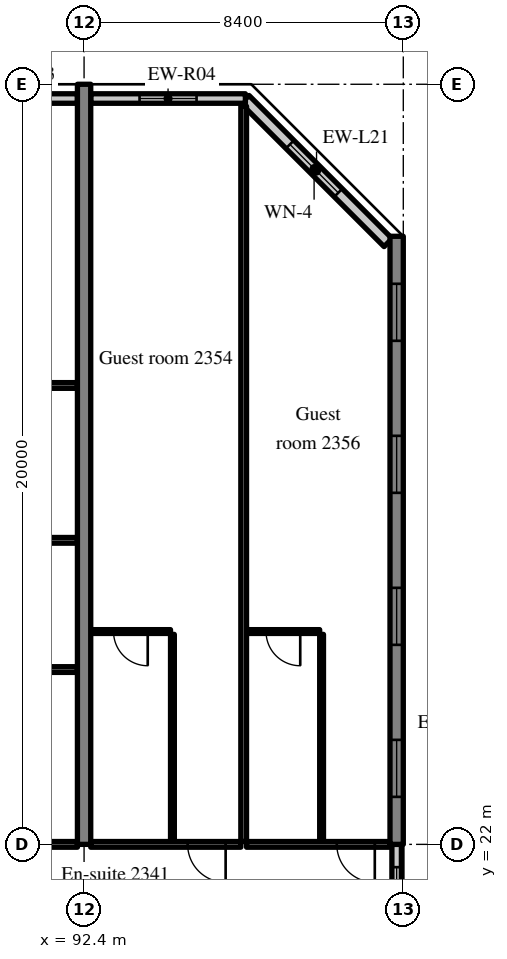
"""IFC4 building model, lengths in metres.
Left out: names, types, materials, properties, quantities, classifications, styles, units other than length and angle.
Written with IfcOpenShell. Run it as: python <this file> out.ifc"""

import sys

from ifc_helpers import new_model, si_unit, direction, frame, frame_2d, origin, place, context, subcontext, project, spatial, rectangle, extrude, source, transform, mapped, element, fill, save


model = new_model("IFC4")
c1 = context("Model", 3, precision=1e-05, world=origin(), true_north=direction((0.0, 1.0)))
c2 = subcontext(c1, "Body", "Model", "MODEL_VIEW")
j1 = project(units=[si_unit("LENGTHUNIT", "METRE"), si_unit("PLANEANGLEUNIT", "RADIAN")], contexts=[c1])
p1 = place(None, origin())
s1 = spatial("IfcSite", under=j1, at=p1, CompositionType="ELEMENT")
p2 = place(p1, origin())
s2 = spatial("IfcBuilding", under=s1, at=p2, CompositionType="ELEMENT")
p3 = place(p2, frame((0.0, 0.0, 99.0)))
s3 = spatial("IfcBuildingStorey", under=s2, at=p3, CompositionType="ELEMENT", Elevation=99.0)
m1 = source(origin(), c2, "Body", "SweptSolid", [
    extrude(rectangle(XDim=20.0, YDim=0.35, at=frame_2d((10.0, 0.0))), origin(), (0.0, 0.0, 1.0), 3.52),
])
p4 = place(p3, frame((92.4, 22.0, 0.0), z_axis=(0.0, 0.0, 1.0), x_axis=(0.0, 1.0, 0.0)))
e1 = element("IfcWall", 1, at=p4, inside=s3, PredefinedType="SHEAR", context=c2, shape_type="MappedRepresentation", body=[
    mapped(m1, transform((0.0, 0.0, 0.0), scale=1.0)),
])
m2 = source(origin(), c2, "Body", "SweptSolid", [
    extrude(rectangle(XDim=16.0, YDim=0.35, at=frame_2d((8.0, 0.0))), origin(), (0.0, 0.0, 1.0), 3.52),
])
p5 = place(p3, frame((100.625, 22.0, 0.0), z_axis=(0.0, 0.0, 1.0), x_axis=(0.0, 1.0, 0.0)))
e2 = element("IfcWall", 2, at=p5, inside=s3, PredefinedType="SHEAR", context=c2, shape_type="MappedRepresentation", body=[
    mapped(m2, transform((0.0, 0.0, 0.0), scale=1.0)),
])
m3 = source(origin(), c2, "Body", "SweptSolid", [
    extrude(rectangle(XDim=1.5, YDim=1.5, at=frame_2d((0.75, 0.75))), frame((0.0, 0.185, 0.0), z_axis=(0.0, -1.0, 0.0), x_axis=(1.0, 0.0, 0.0)), (0.0, 0.0, 1.0), 0.37),
])
p6 = place(p5, frame((1.25, 0.0, 0.9)))
e3 = element("IfcOpeningElement", 3, at=p6, cuts=e2, PredefinedType="OPENING", context=c2, shape_type="MappedRepresentation", body=[
    mapped(m3, transform((0.0, 0.0, 0.0), scale=1.0)),
])
p7 = place(p5, frame((5.25, 0.0, 0.9)))
e4 = element("IfcOpeningElement", 4, at=p7, cuts=e2, PredefinedType="OPENING", context=c2, shape_type="MappedRepresentation", body=[
    mapped(m3, transform((0.0, 0.0, 0.0), scale=1.0)),
])
p8 = place(p5, frame((9.25, 0.0, 0.9)))
e5 = element("IfcOpeningElement", 5, at=p8, cuts=e2, PredefinedType="OPENING", context=c2, shape_type="MappedRepresentation", body=[
    mapped(m3, transform((0.0, 0.0, 0.0), scale=1.0)),
])
p9 = place(p5, frame((13.25, 0.0, 0.9)))
e6 = element("IfcOpeningElement", 6, at=p9, cuts=e2, PredefinedType="OPENING", context=c2, shape_type="MappedRepresentation", body=[
    mapped(m3, transform((0.0, 0.0, 0.0), scale=1.0)),
])
m4 = source(origin(), c2, "Body", "SweptSolid", [
    extrude(rectangle(XDim=5.326, YDim=0.3, at=frame_2d((2.663, 0.0))), origin(), (0.0, 0.0, 1.0), 3.52),
])
p10 = place(p3, frame((100.4, 37.834, 0.0), z_axis=(0.0, 0.0, 1.0), x_axis=(-0.707083859269, 0.707129702361, 0.0)))
e7 = element("IfcWall", 7, at=p10, inside=s3, PredefinedType="SOLIDWALL", context=c2, shape_type="MappedRepresentation", body=[
    mapped(m4, transform((0.0, 0.0, 0.0), scale=1.0)),
])
m5 = source(origin(), c2, "Body", "SweptSolid", [
    extrude(rectangle(XDim=1.8, YDim=1.5, at=frame_2d((0.9, 0.75))), frame((0.0, 0.16, 0.0), z_axis=(0.0, -1.0, 0.0), x_axis=(1.0, 0.0, 0.0)), (0.0, 0.0, 1.0), 0.32),
])
p11 = place(p10, frame((1.854, 0.0, 0.9)))
e8 = element("IfcOpeningElement", 8, at=p11, cuts=e7, PredefinedType="OPENING", context=c2, shape_type="MappedRepresentation", body=[
    mapped(m5, transform((0.0, 0.0, 0.0), scale=1.0)),
])
m6 = source(origin(), c2, "Body", "SweptSolid", [
    extrude(rectangle(XDim=3.675, YDim=0.25, at=frame_2d((1.837, 0.0))), origin(), (0.0, 0.0, 1.0), 2.82),
])
p12 = place(p3, frame((92.225, 41.625, 0.0), z_axis=(0.0, 0.0, 1.0), x_axis=(-1.0, 0.0, 0.0)))
e9 = element("IfcWall", 9, at=p12, inside=s3, PredefinedType="SOLIDWALL", context=c2, shape_type="MappedRepresentation", body=[
    mapped(m6, transform((0.0, 0.0, 0.0), scale=1.0)),
])
m7 = source(origin(), c2, "Body", "SweptSolid", [
    extrude(rectangle(XDim=1.5, YDim=1.5, at=frame_2d((0.75, 0.75))), frame((0.0, 0.135, 0.0), z_axis=(0.0, -1.0, 0.0), x_axis=(1.0, 0.0, 0.0)), (0.0, 0.0, 1.0), 0.27),
])
p13 = place(p12, frame((1.087, 0.0, 0.9)))
e10 = element("IfcOpeningElement", 10, at=p13, cuts=e9, PredefinedType="OPENING", context=c2, shape_type="MappedRepresentation", body=[
    mapped(m7, transform((0.0, 0.0, 0.0), scale=1.0)),
])
m8 = source(origin(), c2, "Body", "SweptSolid", [
    extrude(rectangle(XDim=4.07, YDim=0.25, at=frame_2d((2.035, 0.0))), origin(), (0.0, 0.0, 1.0), 2.82),
])
p14 = place(p3, frame((96.645, 41.625, 0.0), z_axis=(0.0, 0.0, 1.0), x_axis=(-1.0, 0.0, 0.0)))
e11 = element("IfcWall", 11, at=p14, inside=s3, PredefinedType="SOLIDWALL", context=c2, shape_type="MappedRepresentation", body=[
    mapped(m8, transform((0.0, 0.0, 0.0), scale=1.0)),
])
p15 = place(p14, frame((1.285, 0.0, 0.9)))
e12 = element("IfcOpeningElement", 12, at=p15, cuts=e11, PredefinedType="OPENING", context=c2, shape_type="MappedRepresentation", body=[
    mapped(m7, transform((0.0, 0.0, 0.0), scale=1.0)),
])
m9 = source(origin(), c2, "Body", "SweptSolid", [
    extrude(rectangle(XDim=2.4, YDim=0.25, at=frame_2d((1.2, 0.0))), origin(), (0.0, 0.0, 1.0), 2.62),
])
p16 = place(p3, frame((100.625, 19.6, 0.0), z_axis=(0.0, 0.0, 1.0), x_axis=(0.0, 1.0, 0.0)))
e13 = element("IfcWall", 13, at=p16, inside=s3, PredefinedType="SOLIDWALL", context=c2, shape_type="MappedRepresentation", body=[
    mapped(m9, transform((0.0, 0.0, 0.0), scale=1.0)),
])
m10 = source(origin(), c2, "Body", "SweptSolid", [
    extrude(rectangle(XDim=1.2, YDim=1.5, at=frame_2d((0.6, 0.75))), frame((0.0, 0.135, 0.0), z_axis=(0.0, -1.0, 0.0), x_axis=(1.0, 0.0, 0.0)), (0.0, 0.0, 1.0), 0.27),
])
p17 = place(p16, frame((0.6, 0.0, 0.9)))
e14 = element("IfcOpeningElement", 14, at=p17, cuts=e13, PredefinedType="OPENING", context=c2, shape_type="MappedRepresentation", body=[
    mapped(m10, transform((0.0, 0.0, 0.0), scale=1.0)),
])
m11 = source(origin(), c2, "Body", "SweptSolid", [
    extrude(rectangle(XDim=5.5, YDim=0.15, at=frame_2d((2.75, 0.0))), origin(), (0.0, 0.0, 1.0), 2.82),
])
p18 = place(p3, frame((86.725, 22.0, 0.0), z_axis=(0.0, 0.0, 1.0), x_axis=(1.0, 0.0, 0.0)))
e15 = element("IfcWall", 15, at=p18, inside=s3, PredefinedType="PARTITIONING", context=c2, shape_type="MappedRepresentation", body=[
    mapped(m11, transform((0.0, 0.0, 0.0), scale=1.0)),
])
m12 = source(origin(), c2, "Body", "SweptSolid", [
    extrude(rectangle(XDim=5.5, YDim=0.15, at=frame_2d((2.75, 0.0))), origin(), (0.0, 0.0, 1.0), 3.52),
])
for number, where, z_axis, x_axis in (
    (16, (86.725, 26.6, 0.0), (0.0, 0.0, 1.0), (1.0, 0.0, 0.0)),
    (17, (86.725, 30.0, 0.0), (0.0, 0.0, 1.0), (1.0, 0.0, 0.0)),
):
    element("IfcWall", number, at=place(p3, frame(where, z_axis=z_axis, x_axis=x_axis)), inside=s3, PredefinedType="PARTITIONING", context=c2, shape_type="MappedRepresentation", body=[
        mapped(m12, transform((0.0, 0.0, 0.0), scale=1.0)),
    ])
m13 = source(origin(), c2, "Body", "SweptSolid", [
    extrude(rectangle(XDim=8.05, YDim=0.15, at=frame_2d((4.025, 0.0))), origin(), (0.0, 0.0, 1.0), 3.52),
])
p19 = place(p3, frame((84.175, 34.075, 0.0), z_axis=(0.0, 0.0, 1.0), x_axis=(1.0, 0.0, 0.0)))
e18 = element("IfcWall", 18, at=p19, inside=s3, PredefinedType="PARTITIONING", context=c2, shape_type="MappedRepresentation", body=[
    mapped(m13, transform((0.0, 0.0, 0.0), scale=1.0)),
])
m14 = source(origin(), c2, "Body", "SweptSolid", [
    extrude(rectangle(XDim=1.0, YDim=2.1, at=frame_2d((0.5, 1.05))), frame((0.0, 0.085, 0.0), z_axis=(0.0, -1.0, 0.0), x_axis=(1.0, 0.0, 0.0)), (0.0, 0.0, 1.0), 0.17),
])
p20 = place(p19, frame((0.7, 0.0, 0.0)))
e19 = element("IfcOpeningElement", 19, at=p20, cuts=e18, PredefinedType="OPENING", context=c2, shape_type="MappedRepresentation", body=[
    mapped(m14, transform((0.0, 0.0, 0.0), scale=1.0)),
])
m15 = source(origin(), c2, "Body", "SweptSolid", [
    extrude(rectangle(XDim=5.45, YDim=0.1, at=frame_2d((2.725, 0.0))), origin(), (0.0, 0.0, 1.0), 3.52),
])
p21 = place(p3, frame((94.725, 22.075, 0.0), z_axis=(0.0, 0.0, 1.0), x_axis=(0.0, 1.0, 0.0)))
e20 = element("IfcWall", 20, at=p21, inside=s3, PredefinedType="PARTITIONING", context=c2, shape_type="MappedRepresentation", body=[
    mapped(m15, transform((0.0, 0.0, 0.0), scale=1.0)),
])
m16 = source(origin(), c2, "Body", "SweptSolid", [
    extrude(rectangle(XDim=2.1, YDim=0.1, at=frame_2d((1.05, 0.0))), origin(), (0.0, 0.0, 1.0), 3.52),
])
p22 = place(p3, frame((92.575, 27.6, 0.0), z_axis=(0.0, 0.0, 1.0), x_axis=(1.0, 0.0, 0.0)))
e21 = element("IfcWall", 21, at=p22, inside=s3, PredefinedType="PARTITIONING", context=c2, shape_type="MappedRepresentation", body=[
    mapped(m16, transform((0.0, 0.0, 0.0), scale=1.0)),
])
m17 = source(origin(), c2, "Body", "SweptSolid", [
    extrude(rectangle(XDim=0.9, YDim=2.1, at=frame_2d((0.45, 1.05))), frame((0.0, 0.06, 0.0), z_axis=(0.0, -1.0, 0.0), x_axis=(1.0, 0.0, 0.0)), (0.0, 0.0, 1.0), 0.12),
])
p23 = place(p22, frame((0.6, 0.0, 0.0)))
e22 = element("IfcOpeningElement", 22, at=p23, cuts=e21, PredefinedType="OPENING", context=c2, shape_type="MappedRepresentation", body=[
    mapped(m17, transform((0.0, 0.0, 0.0), scale=1.0)),
])
m18 = source(origin(), c2, "Body", "SweptSolid", [
    extrude(rectangle(XDim=3.95, YDim=0.15, at=frame_2d((1.975, 0.0))), origin(), (0.0, 0.0, 1.0), 2.82),
])
p24 = place(p3, frame((92.575, 22.0, 0.0), z_axis=(0.0, 0.0, 1.0), x_axis=(1.0, 0.0, 0.0)))
e23 = element("IfcWall", 23, at=p24, inside=s3, PredefinedType="PARTITIONING", context=c2, shape_type="MappedRepresentation", body=[
    mapped(m18, transform((0.0, 0.0, 0.0), scale=1.0)),
])
p25 = place(p24, frame((2.55, 0.0, 0.0)))
e24 = element("IfcOpeningElement", 24, at=p25, cuts=e23, PredefinedType="OPENING", context=c2, shape_type="MappedRepresentation", body=[
    mapped(m14, transform((0.0, 0.0, 0.0), scale=1.0)),
])
p26 = place(p3, frame((98.65, 22.075, 0.0), z_axis=(0.0, 0.0, 1.0), x_axis=(0.0, 1.0, 0.0)))
e25 = element("IfcWall", 25, at=p26, inside=s3, PredefinedType="PARTITIONING", context=c2, shape_type="MappedRepresentation", body=[
    mapped(m15, transform((0.0, 0.0, 0.0), scale=1.0)),
])
m19 = source(origin(), c2, "Body", "SweptSolid", [
    extrude(rectangle(XDim=1.925, YDim=0.1, at=frame_2d((0.962, 0.0))), origin(), (0.0, 0.0, 1.0), 3.52),
])
p27 = place(p3, frame((96.675, 27.6, 0.0), z_axis=(0.0, 0.0, 1.0), x_axis=(1.0, 0.0, 0.0)))
e26 = element("IfcWall", 26, at=p27, inside=s3, PredefinedType="PARTITIONING", context=c2, shape_type="MappedRepresentation", body=[
    mapped(m19, transform((0.0, 0.0, 0.0), scale=1.0)),
])
p28 = place(p27, frame((0.513, 0.0, 0.0)))
e27 = element("IfcOpeningElement", 27, at=p28, cuts=e26, PredefinedType="OPENING", context=c2, shape_type="MappedRepresentation", body=[
    mapped(m17, transform((0.0, 0.0, 0.0), scale=1.0)),
])
m20 = source(origin(), c2, "Body", "SweptSolid", [
    extrude(rectangle(XDim=3.775, YDim=0.15, at=frame_2d((1.887, 0.0))), origin(), (0.0, 0.0, 1.0), 2.82),
])
p29 = place(p3, frame((96.675, 22.0, 0.0), z_axis=(0.0, 0.0, 1.0), x_axis=(1.0, 0.0, 0.0)))
e28 = element("IfcWall", 28, at=p29, inside=s3, PredefinedType="PARTITIONING", context=c2, shape_type="MappedRepresentation", body=[
    mapped(m20, transform((0.0, 0.0, 0.0), scale=1.0)),
])
p30 = place(p29, frame((2.375, 0.0, 0.0)))
e29 = element("IfcOpeningElement", 29, at=p30, cuts=e28, PredefinedType="OPENING", context=c2, shape_type="MappedRepresentation", body=[
    mapped(m14, transform((0.0, 0.0, 0.0), scale=1.0)),
])
m21 = source(origin(), c2, "Body", "SweptSolid", [
    extrude(rectangle(XDim=19.347, YDim=0.15, at=frame_2d((9.674, 0.0))), origin(), (0.0, 0.0, 1.0), 3.52),
])
p31 = place(p3, frame((96.6, 22.075, 0.0), z_axis=(0.0, 0.0, 1.0), x_axis=(0.0, 1.0, 0.0)))
e30 = element("IfcWall", 30, at=p31, inside=s3, PredefinedType="PARTITIONING", context=c2, shape_type="MappedRepresentation", body=[
    mapped(m21, transform((0.0, 0.0, 0.0), scale=1.0)),
])
m22 = source(origin(), c2, "Body", "SweptSolid", [
    extrude(rectangle(XDim=1.8, YDim=1.5, at=frame_2d((0.9, 0.75))), frame((0.0, 0.03, 0.0), z_axis=(0.0, -1.0, 0.0), x_axis=(1.0, 0.0, 0.0)), (0.0, 0.0, 1.0), 0.06),
])
p32 = place(p11, origin())
e31 = element("IfcWindow", 31, at=p32, inside=s3, PartitioningType="SINGLE_PANEL", PredefinedType="WINDOW", context=c2, shape_type="MappedRepresentation", body=[
    mapped(m22, transform((0.0, 0.0, 0.0), scale=1.0)),
])
fill(e8, e31)
m23 = source(origin(), c2, "Body", "SweptSolid", [
    extrude(rectangle(XDim=1.5, YDim=1.5, at=frame_2d((0.75, 0.75))), frame((0.0, 0.03, 0.0), z_axis=(0.0, -1.0, 0.0), x_axis=(1.0, 0.0, 0.0)), (0.0, 0.0, 1.0), 0.06),
])
p33 = place(p15, origin())
e32 = element("IfcWindow", 32, at=p33, inside=s3, PartitioningType="SINGLE_PANEL", PredefinedType="WINDOW", context=c2, shape_type="MappedRepresentation", body=[
    mapped(m23, transform((0.0, 0.0, 0.0), scale=1.0)),
])
fill(e12, e32)
p34 = place(p6, origin())
e33 = element("IfcWindow", 33, at=p34, inside=s3, PartitioningType="SINGLE_PANEL", PredefinedType="WINDOW", context=c2, shape_type="MappedRepresentation", body=[
    mapped(m23, transform((0.0, 0.0, 0.0), scale=1.0)),
])
fill(e3, e33)
p35 = place(p7, origin())
e34 = element("IfcWindow", 34, at=p35, inside=s3, PartitioningType="SINGLE_PANEL", PredefinedType="WINDOW", context=c2, shape_type="MappedRepresentation", body=[
    mapped(m23, transform((0.0, 0.0, 0.0), scale=1.0)),
])
fill(e4, e34)
p36 = place(p8, origin())
e35 = element("IfcWindow", 35, at=p36, inside=s3, PartitioningType="SINGLE_PANEL", PredefinedType="WINDOW", context=c2, shape_type="MappedRepresentation", body=[
    mapped(m23, transform((0.0, 0.0, 0.0), scale=1.0)),
])
fill(e5, e35)
p37 = place(p9, origin())
e36 = element("IfcWindow", 36, at=p37, inside=s3, PartitioningType="SINGLE_PANEL", PredefinedType="WINDOW", context=c2, shape_type="MappedRepresentation", body=[
    mapped(m23, transform((0.0, 0.0, 0.0), scale=1.0)),
])
fill(e6, e36)
m24 = source(origin(), c2, "Body", "SweptSolid", [
    extrude(rectangle(XDim=1.2, YDim=1.5, at=frame_2d((0.6, 0.75))), frame((0.0, 0.03, 0.0), z_axis=(0.0, -1.0, 0.0), x_axis=(1.0, 0.0, 0.0)), (0.0, 0.0, 1.0), 0.06),
])
p38 = place(p17, origin())
e37 = element("IfcWindow", 37, at=p38, inside=s3, PartitioningType="SINGLE_PANEL", PredefinedType="WINDOW", context=c2, shape_type="MappedRepresentation", body=[
    mapped(m24, transform((0.0, 0.0, 0.0), scale=1.0)),
])
fill(e14, e37)
m25 = source(origin(), c2, "Body", "SweptSolid", [
    extrude(rectangle(XDim=0.9, YDim=2.1, at=frame_2d((0.45, 1.05))), frame((0.0, 0.025, 0.0), z_axis=(0.0, -1.0, 0.0), x_axis=(1.0, 0.0, 0.0)), (0.0, 0.0, 1.0), 0.05),
])
p39 = place(p23, origin())
e38 = element("IfcDoor", 38, at=p39, inside=s3, OperationType="SINGLE_SWING_RIGHT", PredefinedType="DOOR", context=c2, shape_type="MappedRepresentation", body=[
    mapped(m25, transform((0.0, 0.0, 0.0), scale=1.0)),
])
fill(e22, e38)
m26 = source(origin(), c2, "Body", "SweptSolid", [
    extrude(rectangle(XDim=1.0, YDim=2.1, at=frame_2d((0.5, 1.05))), frame((0.0, 0.025, 0.0), z_axis=(0.0, -1.0, 0.0), x_axis=(1.0, 0.0, 0.0)), (0.0, 0.0, 1.0), 0.05),
])
p40 = place(p25, origin())
e39 = element("IfcDoor", 39, at=p40, inside=s3, OperationType="SINGLE_SWING_RIGHT", PredefinedType="DOOR", context=c2, shape_type="MappedRepresentation", body=[
    mapped(m26, transform((0.0, 0.0, 0.0), scale=1.0)),
])
fill(e24, e39)
p41 = place(p28, origin())
e40 = element("IfcDoor", 40, at=p41, inside=s3, OperationType="SINGLE_SWING_RIGHT", PredefinedType="DOOR", context=c2, shape_type="MappedRepresentation", body=[
    mapped(m25, transform((0.0, 0.0, 0.0), scale=1.0)),
])
fill(e27, e40)
p42 = place(p30, origin())
e41 = element("IfcDoor", 41, at=p42, inside=s3, OperationType="SINGLE_SWING_RIGHT", PredefinedType="DOOR", context=c2, shape_type="MappedRepresentation", body=[
    mapped(m26, transform((0.0, 0.0, 0.0), scale=1.0)),
])
fill(e29, e41)
save(model, sys.argv[1])
